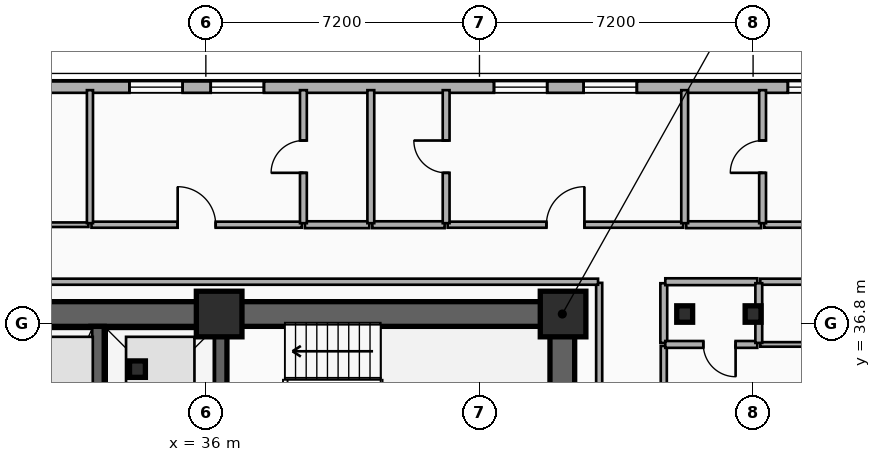
"""IFC4 building model, lengths in metres.
Left out: names, types, materials, properties, quantities, classifications, styles, units other than length and angle.
Written with IfcOpenShell. Run it as: python <this file> out.ifc"""

import sys

from ifc_helpers import new_model, si_unit, direction, frame, frame_2d, origin, origin_2d, place, context, subcontext, project, spatial, rectangle, i_section, extrude, element, fill, save


model = new_model("IFC4")
c1 = context("Model", 3, precision=1e-05, world=origin(), true_north=direction((0.0, 1.0)))
c2 = subcontext(c1, "Body", "Model", "MODEL_VIEW")
j1 = project(units=[si_unit("LENGTHUNIT", "METRE"), si_unit("PLANEANGLEUNIT", "RADIAN")], contexts=[c1])
p1 = place(None, origin())
s1 = spatial("IfcSite", under=j1, at=p1, CompositionType="ELEMENT")
p2 = place(p1, origin())
s2 = spatial("IfcBuilding", under=s1, at=p2, CompositionType="ELEMENT")
p3 = place(p2, frame((0.0, 0.0, 104.8)))
s3 = spatial("IfcBuildingStorey", under=s2, at=p3, CompositionType="ELEMENT", Elevation=104.8)
p4 = place(p3, frame((12.15, 37.05, 0.0), z_axis=(0.0, 0.0, 1.0), x_axis=(1.0, 0.0, 0.0)))
e1 = element("IfcWall", 1, at=p4, inside=s3, PredefinedType="SHEAR", context=c2, shape_type="SweptSolid", body=[
    extrude(rectangle(XDim=33.23, YDim=0.65, at=frame_2d((16.615, 0.0))), origin(), (0.0, 0.0, 1.0), 3.5),
])
p5 = place(p3, frame((45.38, 28.145, 0.0), z_axis=(0.0, 0.0, 1.0), x_axis=(0.0, 1.0, 0.0)))
e2 = element("IfcWall", 2, at=p5, inside=s3, PredefinedType="SHEAR", context=c2, shape_type="SweptSolid", body=[
    extrude(rectangle(XDim=8.58, YDim=0.65, at=frame_2d((4.29, 0.0))), origin(), (0.0, 0.0, 1.0), 3.5),
])
p6 = place(p3, frame((33.15, 28.145, 0.0), z_axis=(0.0, 0.0, 1.0), x_axis=(0.0, 1.0, 0.0)))
e3 = element("IfcWall", 3, at=p6, inside=s3, PredefinedType="SHEAR", context=c2, shape_type="SweptSolid", body=[
    extrude(rectangle(XDim=8.58, YDim=0.35, at=frame_2d((4.29, 0.0))), origin(), (0.0, 0.0, 1.0), 3.5),
])
p7 = place(p3, frame((36.38, 28.145, 0.0), z_axis=(0.0, 0.0, 1.0), x_axis=(0.0, 1.0, 0.0)))
e4 = element("IfcWall", 4, at=p7, inside=s3, PredefinedType="SHEAR", context=c2, shape_type="SweptSolid", body=[
    extrude(rectangle(XDim=8.58, YDim=0.35, at=frame_2d((4.29, 0.0))), origin(), (0.0, 0.0, 1.0), 3.5),
])
p8 = place(p7, frame((3.635, 0.0, 0.0)))
e5 = element("IfcOpeningElement", 5, at=p8, cuts=e4, PredefinedType="OPENING", context=c2, shape_type="SweptSolid", body=[
    extrude(rectangle(XDim=1.1, YDim=2.15, at=frame_2d((0.55, 1.075))), frame((0.0, 0.185, 0.0), z_axis=(0.0, -1.0, 0.0), x_axis=(1.0, 0.0, 0.0)), (0.0, 0.0, 1.0), 0.37),
])
p9 = place(p3, frame((34.2, 35.6, 0.0), z_axis=(0.0, 0.0, 1.0), x_axis=(1.0, 0.0, 0.0)))
e6 = element("IfcColumn", 6, at=p9, inside=s3, PredefinedType="COLUMN", context=c2, shape_type="SweptSolid", body=[
    extrude(i_section(OverallWidth=0.418, OverallDepth=0.432, WebThickness=0.035, FlangeThickness=0.056, FilletRadius=0.015, at=origin_2d()), origin(), (0.0, 0.0, 1.0), 3.5),
])
for number, where, z_axis, x_axis in (
    (7, (36.35, 37.05, 0.0), (0.0, 0.0, 1.0), (1.0, 0.0, 0.0)),
    (8, (45.4, 37.05, 0.0), (0.0, 0.0, 1.0), (1.0, 0.0, 0.0)),
):
    element("IfcColumn", number, at=place(p3, frame(where, z_axis=z_axis, x_axis=x_axis)), inside=s3, PredefinedType="COLUMN", context=c2, shape_type="SweptSolid", body=[
        extrude(rectangle(XDim=1.2, YDim=1.2, at=origin_2d()), origin(), (0.0, 0.0, 1.0), 3.5),
    ])
for number, where, z_axis, x_axis in (
    (9, (48.6, 37.05, 0.0), (0.0, 0.0, 1.0), (1.0, 0.0, 0.0)),
    (10, (50.4, 37.05, 0.0), (0.0, 0.0, 1.0), (1.0, 0.0, 0.0)),
):
    element("IfcColumn", number, at=place(p3, frame(where, z_axis=z_axis, x_axis=x_axis)), inside=s3, PredefinedType="COLUMN", context=c2, shape_type="SweptSolid", body=[
        extrude(i_section(OverallWidth=0.418, OverallDepth=0.432, WebThickness=0.035, FlangeThickness=0.056, FilletRadius=0.015, at=origin_2d()), origin(), (0.0, 0.0, 1.0), 3.5),
    ])
p10 = place(p3, frame((4.2, 43.02, 0.0), z_axis=(0.0, 0.0, 1.0), x_axis=(1.0, 0.0, 0.0)))
e11 = element("IfcWall", 11, at=p10, inside=s3, PredefinedType="SOLIDWALL", context=c2, shape_type="SweptSolid", body=[
    extrude(rectangle(XDim=49.2, YDim=0.3, at=frame_2d((24.6, 0.0))), origin(), (0.0, 0.0, 1.0), 3.24),
])
p11 = place(p10, frame((11.657, 0.0, 0.85)))
e12 = element("IfcOpeningElement", 12, at=p11, cuts=e11, PredefinedType="OPENING", context=c2, shape_type="SweptSolid", body=[
    extrude(rectangle(XDim=1.4, YDim=1.8, at=frame_2d((0.7, 0.9))), frame((0.0, 0.16, 0.0), z_axis=(0.0, -1.0, 0.0), x_axis=(1.0, 0.0, 0.0)), (0.0, 0.0, 1.0), 0.32),
])
p12 = place(p10, frame((20.053, 0.0, 0.85)))
e13 = element("IfcOpeningElement", 13, at=p12, cuts=e11, PredefinedType="OPENING", context=c2, shape_type="SweptSolid", body=[
    extrude(rectangle(XDim=1.4, YDim=1.8, at=frame_2d((0.7, 0.9))), frame((0.0, 0.16, 0.0), z_axis=(0.0, -1.0, 0.0), x_axis=(1.0, 0.0, 0.0)), (0.0, 0.0, 1.0), 0.32),
])
p13 = place(p10, frame((29.789, 0.0, 0.85)))
e14 = element("IfcOpeningElement", 14, at=p13, cuts=e11, PredefinedType="OPENING", context=c2, shape_type="SweptSolid", body=[
    extrude(rectangle(XDim=1.4, YDim=1.8, at=frame_2d((0.7, 0.9))), frame((0.0, 0.16, 0.0), z_axis=(0.0, -1.0, 0.0), x_axis=(1.0, 0.0, 0.0)), (0.0, 0.0, 1.0), 0.32),
])
p14 = place(p10, frame((31.928, 0.0, 0.85)))
e15 = element("IfcOpeningElement", 15, at=p14, cuts=e11, PredefinedType="OPENING", context=c2, shape_type="SweptSolid", body=[
    extrude(rectangle(XDim=1.4, YDim=1.8, at=frame_2d((0.7, 0.9))), frame((0.0, 0.16, 0.0), z_axis=(0.0, -1.0, 0.0), x_axis=(1.0, 0.0, 0.0)), (0.0, 0.0, 1.0), 0.32),
])
p15 = place(p10, frame((39.382, 0.0, 0.85)))
e16 = element("IfcOpeningElement", 16, at=p15, cuts=e11, PredefinedType="OPENING", context=c2, shape_type="SweptSolid", body=[
    extrude(rectangle(XDim=1.4, YDim=1.8, at=frame_2d((0.7, 0.9))), frame((0.0, 0.16, 0.0), z_axis=(0.0, -1.0, 0.0), x_axis=(1.0, 0.0, 0.0)), (0.0, 0.0, 1.0), 0.32),
])
p16 = place(p10, frame((41.741, 0.0, 0.85)))
e17 = element("IfcOpeningElement", 17, at=p16, cuts=e11, PredefinedType="OPENING", context=c2, shape_type="SweptSolid", body=[
    extrude(rectangle(XDim=1.4, YDim=1.8, at=frame_2d((0.7, 0.9))), frame((0.0, 0.16, 0.0), z_axis=(0.0, -1.0, 0.0), x_axis=(1.0, 0.0, 0.0)), (0.0, 0.0, 1.0), 0.32),
])
p17 = place(p10, frame((47.115, 0.0, 0.85)))
e18 = element("IfcOpeningElement", 18, at=p17, cuts=e11, PredefinedType="OPENING", context=c2, shape_type="SweptSolid", body=[
    extrude(rectangle(XDim=1.4, YDim=1.8, at=frame_2d((0.7, 0.9))), frame((0.0, 0.16, 0.0), z_axis=(0.0, -1.0, 0.0), x_axis=(1.0, 0.0, 0.0)), (0.0, 0.0, 1.0), 0.32),
])
p18 = place(p3, frame((48.05, 33.149, 0.0), z_axis=(0.0, 0.0, 1.0), x_axis=(0.0, 1.0, 0.0)))
e19 = element("IfcWall", 19, at=p18, inside=s3, PredefinedType="PARTITIONING", context=c2, shape_type="SweptSolid", body=[
    extrude(rectangle(XDim=3.061, YDim=0.16, at=frame_2d((1.531, 0.0))), origin(), (0.0, 0.0, 1.0), 3.24),
])
p19 = place(p18, frame((1.031, 0.0, 0.0)))
e20 = element("IfcOpeningElement", 20, at=p19, cuts=e19, PredefinedType="OPENING", context=c2, shape_type="SweptSolid", body=[
    extrude(rectangle(XDim=1.0, YDim=2.15, at=frame_2d((0.5, 1.075))), frame((0.0, 0.09, 0.0), z_axis=(0.0, -1.0, 0.0), x_axis=(1.0, 0.0, 0.0)), (0.0, 0.0, 1.0), 0.18),
])
p20 = place(p3, frame((48.05, 36.29, 0.0), z_axis=(0.0, 0.0, 1.0), x_axis=(0.0, 1.0, 0.0)))
e21 = element("IfcWall", 21, at=p20, inside=s3, PredefinedType="PLUMBINGWALL", context=c2, shape_type="SweptSolid", body=[
    extrude(rectangle(XDim=1.57, YDim=0.18, at=frame_2d((0.785, 0.0))), origin(), (0.0, 0.0, 1.0), 2.72),
])
p21 = place(p3, frame((48.09, 37.9, 0.0), z_axis=(0.0, 0.0, 1.0), x_axis=(1.0, 0.0, 0.0)))
e22 = element("IfcWall", 22, at=p21, inside=s3, PredefinedType="PLUMBINGWALL", context=c2, shape_type="SweptSolid", body=[
    extrude(rectangle(XDim=2.42, YDim=0.18, at=frame_2d((1.21, 0.0))), origin(), (0.0, 0.0, 1.0), 3.24),
])
p22 = place(p3, frame((50.59, 37.9, 0.0), z_axis=(0.0, 0.0, 1.0), x_axis=(1.0, 0.0, 0.0)))
e23 = element("IfcWall", 23, at=p22, inside=s3, PredefinedType="PARTITIONING", context=c2, shape_type="SweptSolid", body=[
    extrude(rectangle(XDim=6.75, YDim=0.16, at=frame_2d((3.375, 0.0))), origin(), (0.0, 0.0, 1.0), 3.24),
])
p23 = place(p3, frame((8.6, 39.4, 0.0), z_axis=(0.0, 0.0, 1.0), x_axis=(1.0, 0.0, 0.0)))
e24 = element("IfcWall", 24, at=p23, inside=s3, PredefinedType="PARTITIONING", context=c2, shape_type="SweptSolid", body=[
    extrude(rectangle(XDim=24.31, YDim=0.12, at=frame_2d((12.155, 0.0))), origin(), (0.0, 0.0, 1.0), 3.24),
])
p24 = place(p23, frame((11.705, 0.0, 0.0)))
e25 = element("IfcOpeningElement", 25, at=p24, cuts=e24, PredefinedType="OPENING", context=c2, shape_type="SweptSolid", body=[
    extrude(rectangle(XDim=0.9, YDim=2.1, at=frame_2d((0.45, 1.05))), frame((0.0, 0.07, 0.0), z_axis=(0.0, -1.0, 0.0), x_axis=(1.0, 0.0, 0.0)), (0.0, 0.0, 1.0), 0.14),
])
p25 = place(p3, frame((32.99, 39.4, 0.0), z_axis=(0.0, 0.0, 1.0), x_axis=(1.0, 0.0, 0.0)))
e26 = element("IfcWall", 26, at=p25, inside=s3, PredefinedType="PARTITIONING", context=c2, shape_type="SweptSolid", body=[
    extrude(rectangle(XDim=5.537, YDim=0.16, at=frame_2d((2.769, 0.0))), origin(), (0.0, 0.0, 1.0), 3.24),
])
p26 = place(p25, frame((2.269, 0.0, 0.0)))
e27 = element("IfcOpeningElement", 27, at=p26, cuts=e26, PredefinedType="OPENING", context=c2, shape_type="SweptSolid", body=[
    extrude(rectangle(XDim=1.0, YDim=2.15, at=frame_2d((0.5, 1.075))), frame((0.0, 0.09, 0.0), z_axis=(0.0, -1.0, 0.0), x_axis=(1.0, 0.0, 0.0)), (0.0, 0.0, 1.0), 0.18),
])
p27 = place(p3, frame((38.607, 39.4, 0.0), z_axis=(0.0, 0.0, 1.0), x_axis=(1.0, 0.0, 0.0)))
e28 = element("IfcWall", 28, at=p27, inside=s3, PredefinedType="PLUMBINGWALL", context=c2, shape_type="SweptSolid", body=[
    extrude(rectangle(XDim=1.694, YDim=0.18, at=frame_2d((0.847, 0.0))), origin(), (0.0, 0.0, 1.0), 3.24),
])
p28 = place(p3, frame((42.363, 39.4, 0.0), z_axis=(0.0, 0.0, 1.0), x_axis=(1.0, 0.0, 0.0)))
e29 = element("IfcWall", 29, at=p28, inside=s3, PredefinedType="PARTITIONING", context=c2, shape_type="SweptSolid", body=[
    extrude(rectangle(XDim=6.197, YDim=0.16, at=frame_2d((3.099, 0.0))), origin(), (0.0, 0.0, 1.0), 3.24),
])
p29 = place(p28, frame((2.598, 0.0, 0.0)))
e30 = element("IfcOpeningElement", 30, at=p29, cuts=e29, PredefinedType="OPENING", context=c2, shape_type="SweptSolid", body=[
    extrude(rectangle(XDim=1.0, YDim=2.15, at=frame_2d((0.5, 1.075))), frame((0.0, 0.09, 0.0), z_axis=(0.0, -1.0, 0.0), x_axis=(1.0, 0.0, 0.0)), (0.0, 0.0, 1.0), 0.18),
])
p30 = place(p3, frame((40.381, 39.4, 0.0), z_axis=(0.0, 0.0, 1.0), x_axis=(1.0, 0.0, 0.0)))
e31 = element("IfcWall", 31, at=p30, inside=s3, PredefinedType="PLUMBINGWALL", context=c2, shape_type="SweptSolid", body=[
    extrude(rectangle(XDim=1.902, YDim=0.18, at=frame_2d((0.951, 0.0))), origin(), (0.0, 0.0, 1.0), 3.24),
])
p31 = place(p3, frame((50.69, 39.4, 0.0), z_axis=(0.0, 0.0, 1.0), x_axis=(1.0, 0.0, 0.0)))
e32 = element("IfcWall", 32, at=p31, inside=s3, PredefinedType="PARTITIONING", context=c2, shape_type="SweptSolid", body=[
    extrude(rectangle(XDim=6.65, YDim=0.16, at=frame_2d((3.325, 0.0))), origin(), (0.0, 0.0, 1.0), 3.24),
])
p32 = place(p31, frame((2.825, 0.0, 0.0)))
e33 = element("IfcOpeningElement", 33, at=p32, cuts=e32, PredefinedType="OPENING", context=c2, shape_type="SweptSolid", body=[
    extrude(rectangle(XDim=1.0, YDim=2.15, at=frame_2d((0.5, 1.075))), frame((0.0, 0.09, 0.0), z_axis=(0.0, -1.0, 0.0), x_axis=(1.0, 0.0, 0.0)), (0.0, 0.0, 1.0), 0.18),
])
p33 = place(p3, frame((48.64, 39.4, 0.0), z_axis=(0.0, 0.0, 1.0), x_axis=(1.0, 0.0, 0.0)))
e34 = element("IfcWall", 34, at=p33, inside=s3, PredefinedType="PLUMBINGWALL", context=c2, shape_type="SweptSolid", body=[
    extrude(rectangle(XDim=1.97, YDim=0.18, at=frame_2d((0.985, 0.0))), origin(), (0.0, 0.0, 1.0), 3.24),
])
p34 = place(p3, frame((50.51, 36.25, 0.0), z_axis=(0.0, 0.0, 1.0), x_axis=(-1.0, 0.0, 0.0)))
e35 = element("IfcWall", 35, at=p34, inside=s3, PredefinedType="PLUMBINGWALL", context=c2, shape_type="SweptSolid", body=[
    extrude(rectangle(XDim=2.42, YDim=0.18, at=frame_2d((1.21, 0.0))), origin(), (0.0, 0.0, 1.0), 2.57),
])
p35 = place(p34, frame((0.57, 0.0, 0.0)))
e36 = element("IfcOpeningElement", 36, at=p35, cuts=e35, PredefinedType="OPENING", context=c2, shape_type="SweptSolid", body=[
    extrude(rectangle(XDim=0.85, YDim=2.1, at=frame_2d((0.425, 1.05))), frame((0.0, 0.1, 0.0), z_axis=(0.0, -1.0, 0.0), x_axis=(1.0, 0.0, 0.0)), (0.0, 0.0, 1.0), 0.2),
])
p36 = place(p3, frame((50.59, 36.25, 0.0), z_axis=(0.0, 0.0, 1.0), x_axis=(1.0, 0.0, 0.0)))
e37 = element("IfcWall", 37, at=p36, inside=s3, PredefinedType="PARTITIONING", context=c2, shape_type="SweptSolid", body=[
    extrude(rectangle(XDim=6.75, YDim=0.12, at=frame_2d((3.375, 0.0))), origin(), (0.0, 0.0, 1.0), 2.57),
])
p37 = place(p36, frame((2.925, 0.0, 0.0)))
e38 = element("IfcOpeningElement", 38, at=p37, cuts=e37, PredefinedType="OPENING", context=c2, shape_type="SweptSolid", body=[
    extrude(rectangle(XDim=0.9, YDim=2.1, at=frame_2d((0.45, 1.05))), frame((0.0, 0.07, 0.0), z_axis=(0.0, -1.0, 0.0), x_axis=(1.0, 0.0, 0.0)), (0.0, 0.0, 1.0), 0.14),
])
p38 = place(p3, frame((50.55, 36.29, 0.0), z_axis=(0.0, 0.0, 1.0), x_axis=(0.0, 1.0, 0.0)))
e39 = element("IfcWall", 39, at=p38, inside=s3, PredefinedType="PLUMBINGWALL", context=c2, shape_type="SweptSolid", body=[
    extrude(rectangle(XDim=1.57, YDim=0.18, at=frame_2d((0.785, 0.0))), origin(), (0.0, 0.0, 1.0), 2.57),
])
p39 = place(p3, frame((32.95, 39.44, 0.0), z_axis=(0.0, 0.0, 1.0), x_axis=(0.0, 1.0, 0.0)))
e40 = element("IfcWall", 40, at=p39, inside=s3, PredefinedType="PARTITIONING", context=c2, shape_type="SweptSolid", body=[
    extrude(rectangle(XDim=3.5, YDim=0.16, at=frame_2d((1.75, 0.0))), origin(), (0.0, 0.0, 1.0), 3.24),
])
p40 = place(p3, frame((38.567, 39.44, 0.0), z_axis=(0.0, 0.0, 1.0), x_axis=(0.0, 1.0, 0.0)))
e41 = element("IfcWall", 41, at=p40, inside=s3, PredefinedType="PLUMBINGWALL", context=c2, shape_type="SweptSolid", body=[
    extrude(rectangle(XDim=3.5, YDim=0.18, at=frame_2d((1.75, 0.0))), origin(), (0.0, 0.0, 1.0), 3.24),
])
p41 = place(p40, frame((1.325, 0.0, 0.0)))
e42 = element("IfcOpeningElement", 42, at=p41, cuts=e41, PredefinedType="OPENING", context=c2, shape_type="SweptSolid", body=[
    extrude(rectangle(XDim=0.85, YDim=2.1, at=frame_2d((0.425, 1.05))), frame((0.0, 0.1, 0.0), z_axis=(0.0, -1.0, 0.0), x_axis=(1.0, 0.0, 0.0)), (0.0, 0.0, 1.0), 0.2),
])
p42 = place(p3, frame((40.341, 39.44, 0.0), z_axis=(0.0, 0.0, 1.0), x_axis=(0.0, 1.0, 0.0)))
e43 = element("IfcWall", 43, at=p42, inside=s3, PredefinedType="PLUMBINGWALL", context=c2, shape_type="SweptSolid", body=[
    extrude(rectangle(XDim=3.5, YDim=0.18, at=frame_2d((1.75, 0.0))), origin(), (0.0, 0.0, 1.0), 3.24),
])
p43 = place(p3, frame((42.323, 39.44, 0.0), z_axis=(0.0, 0.0, 1.0), x_axis=(0.0, 1.0, 0.0)))
e44 = element("IfcWall", 44, at=p43, inside=s3, PredefinedType="PLUMBINGWALL", context=c2, shape_type="SweptSolid", body=[
    extrude(rectangle(XDim=3.5, YDim=0.18, at=frame_2d((1.75, 0.0))), origin(), (0.0, 0.0, 1.0), 3.24),
])
p44 = place(p43, frame((1.325, 0.0, 0.0)))
e45 = element("IfcOpeningElement", 45, at=p44, cuts=e44, PredefinedType="OPENING", context=c2, shape_type="SweptSolid", body=[
    extrude(rectangle(XDim=0.85, YDim=2.1, at=frame_2d((0.425, 1.05))), frame((0.0, 0.1, 0.0), z_axis=(0.0, -1.0, 0.0), x_axis=(1.0, 0.0, 0.0)), (0.0, 0.0, 1.0), 0.2),
])
p45 = place(p3, frame((48.6, 39.44, 0.0), z_axis=(0.0, 0.0, 1.0), x_axis=(0.0, 1.0, 0.0)))
e46 = element("IfcWall", 46, at=p45, inside=s3, PredefinedType="PLUMBINGWALL", context=c2, shape_type="SweptSolid", body=[
    extrude(rectangle(XDim=3.5, YDim=0.18, at=frame_2d((1.75, 0.0))), origin(), (0.0, 0.0, 1.0), 3.24),
])
p46 = place(p3, frame((50.65, 39.44, 0.0), z_axis=(0.0, 0.0, 1.0), x_axis=(0.0, 1.0, 0.0)))
e47 = element("IfcWall", 47, at=p46, inside=s3, PredefinedType="PLUMBINGWALL", context=c2, shape_type="SweptSolid", body=[
    extrude(rectangle(XDim=3.5, YDim=0.18, at=frame_2d((1.75, 0.0))), origin(), (0.0, 0.0, 1.0), 3.24),
])
p47 = place(p46, frame((1.325, 0.0, 0.0)))
e48 = element("IfcOpeningElement", 48, at=p47, cuts=e47, PredefinedType="OPENING", context=c2, shape_type="SweptSolid", body=[
    extrude(rectangle(XDim=0.85, YDim=2.1, at=frame_2d((0.425, 1.05))), frame((0.0, 0.1, 0.0), z_axis=(0.0, -1.0, 0.0), x_axis=(1.0, 0.0, 0.0)), (0.0, 0.0, 1.0), 0.2),
])
p48 = place(p3, frame((46.35, 27.63, 0.0), z_axis=(0.0, 0.0, 1.0), x_axis=(0.0, 1.0, 0.0)))
e49 = element("IfcWall", 49, at=p48, inside=s3, PredefinedType="PARTITIONING", context=c2, shape_type="SweptSolid", body=[
    extrude(rectangle(XDim=10.24, YDim=0.16, at=frame_2d((5.12, 0.0))), origin(), (0.0, 0.0, 1.0), 2.72),
])
p49 = place(p3, frame((11.28, 37.9, 0.0), z_axis=(0.0, 0.0, 1.0), x_axis=(1.0, 0.0, 0.0)))
e50 = element("IfcWall", 50, at=p49, inside=s3, PredefinedType="PARTITIONING", context=c2, shape_type="SweptSolid", body=[
    extrude(rectangle(XDim=35.04, YDim=0.16, at=frame_2d((17.52, 0.0))), origin(), (0.0, 0.0, 1.0), 3.24),
])
p50 = place(p13, origin())
e51 = element("IfcWindow", 51, at=p50, inside=s3, PartitioningType="SINGLE_PANEL", PredefinedType="WINDOW", context=c2, shape_type="SweptSolid", body=[
    extrude(rectangle(XDim=1.4, YDim=1.8, at=frame_2d((0.7, 0.9))), frame((0.0, 0.03, 0.0), z_axis=(0.0, -1.0, 0.0), x_axis=(1.0, 0.0, 0.0)), (0.0, 0.0, 1.0), 0.06),
])
fill(e14, e51)
p51 = place(p14, origin())
e52 = element("IfcWindow", 52, at=p51, inside=s3, PartitioningType="SINGLE_PANEL", PredefinedType="WINDOW", context=c2, shape_type="SweptSolid", body=[
    extrude(rectangle(XDim=1.4, YDim=1.8, at=frame_2d((0.7, 0.9))), frame((0.0, 0.03, 0.0), z_axis=(0.0, -1.0, 0.0), x_axis=(1.0, 0.0, 0.0)), (0.0, 0.0, 1.0), 0.06),
])
fill(e15, e52)
p52 = place(p15, origin())
e53 = element("IfcWindow", 53, at=p52, inside=s3, PartitioningType="SINGLE_PANEL", PredefinedType="WINDOW", context=c2, shape_type="SweptSolid", body=[
    extrude(rectangle(XDim=1.4, YDim=1.8, at=frame_2d((0.7, 0.9))), frame((0.0, 0.03, 0.0), z_axis=(0.0, -1.0, 0.0), x_axis=(1.0, 0.0, 0.0)), (0.0, 0.0, 1.0), 0.06),
])
fill(e16, e53)
p53 = place(p16, origin())
e54 = element("IfcWindow", 54, at=p53, inside=s3, PartitioningType="SINGLE_PANEL", PredefinedType="WINDOW", context=c2, shape_type="SweptSolid", body=[
    extrude(rectangle(XDim=1.4, YDim=1.8, at=frame_2d((0.7, 0.9))), frame((0.0, 0.03, 0.0), z_axis=(0.0, -1.0, 0.0), x_axis=(1.0, 0.0, 0.0)), (0.0, 0.0, 1.0), 0.06),
])
fill(e17, e54)
p54 = place(p17, origin())
e55 = element("IfcWindow", 55, at=p54, inside=s3, PartitioningType="SINGLE_PANEL", PredefinedType="WINDOW", context=c2, shape_type="SweptSolid", body=[
    extrude(rectangle(XDim=1.4, YDim=1.8, at=frame_2d((0.7, 0.9))), frame((0.0, 0.03, 0.0), z_axis=(0.0, -1.0, 0.0), x_axis=(1.0, 0.0, 0.0)), (0.0, 0.0, 1.0), 0.06),
])
fill(e18, e55)
p55 = place(p26, origin())
e56 = element("IfcDoor", 56, at=p55, inside=s3, OperationType="SINGLE_SWING_LEFT", PredefinedType="DOOR", context=c2, shape_type="SweptSolid", body=[
    extrude(rectangle(XDim=1.0, YDim=2.15, at=frame_2d((0.5, 1.075))), frame((0.0, 0.025, 0.0), z_axis=(0.0, -1.0, 0.0), x_axis=(1.0, 0.0, 0.0)), (0.0, 0.0, 1.0), 0.05),
])
fill(e27, e56)
p56 = place(p29, origin())
e57 = element("IfcDoor", 57, at=p56, inside=s3, OperationType="SINGLE_SWING_RIGHT", PredefinedType="DOOR", context=c2, shape_type="SweptSolid", body=[
    extrude(rectangle(XDim=1.0, YDim=2.15, at=frame_2d((0.5, 1.075))), frame((0.0, 0.025, 0.0), z_axis=(0.0, -1.0, 0.0), x_axis=(1.0, 0.0, 0.0)), (0.0, 0.0, 1.0), 0.05),
])
fill(e30, e57)
p57 = place(p35, origin())
e58 = element("IfcDoor", 58, at=p57, inside=s3, OperationType="SINGLE_SWING_LEFT", PredefinedType="DOOR", context=c2, shape_type="SweptSolid", body=[
    extrude(rectangle(XDim=0.85, YDim=2.1, at=frame_2d((0.425, 1.05))), frame((0.0, 0.025, 0.0), z_axis=(0.0, -1.0, 0.0), x_axis=(1.0, 0.0, 0.0)), (0.0, 0.0, 1.0), 0.05),
])
fill(e36, e58)
p58 = place(p41, origin())
e59 = element("IfcDoor", 59, at=p58, inside=s3, OperationType="SINGLE_SWING_LEFT", PredefinedType="DOOR", context=c2, shape_type="SweptSolid", body=[
    extrude(rectangle(XDim=0.85, YDim=2.1, at=frame_2d((0.425, 1.05))), frame((0.0, 0.025, 0.0), z_axis=(0.0, -1.0, 0.0), x_axis=(1.0, 0.0, 0.0)), (0.0, 0.0, 1.0), 0.05),
])
fill(e42, e59)
p59 = place(p44, origin())
e60 = element("IfcDoor", 60, at=p59, inside=s3, OperationType="SINGLE_SWING_RIGHT", PredefinedType="DOOR", context=c2, shape_type="SweptSolid", body=[
    extrude(rectangle(XDim=0.85, YDim=2.1, at=frame_2d((0.425, 1.05))), frame((0.0, 0.025, 0.0), z_axis=(0.0, -1.0, 0.0), x_axis=(1.0, 0.0, 0.0)), (0.0, 0.0, 1.0), 0.05),
])
fill(e45, e60)
p60 = place(p47, origin())
e61 = element("IfcDoor", 61, at=p60, inside=s3, OperationType="SINGLE_SWING_LEFT", PredefinedType="DOOR", context=c2, shape_type="SweptSolid", body=[
    extrude(rectangle(XDim=0.85, YDim=2.1, at=frame_2d((0.425, 1.05))), frame((0.0, 0.025, 0.0), z_axis=(0.0, -1.0, 0.0), x_axis=(1.0, 0.0, 0.0)), (0.0, 0.0, 1.0), 0.05),
])
fill(e48, e61)
save(model, sys.argv[1])
